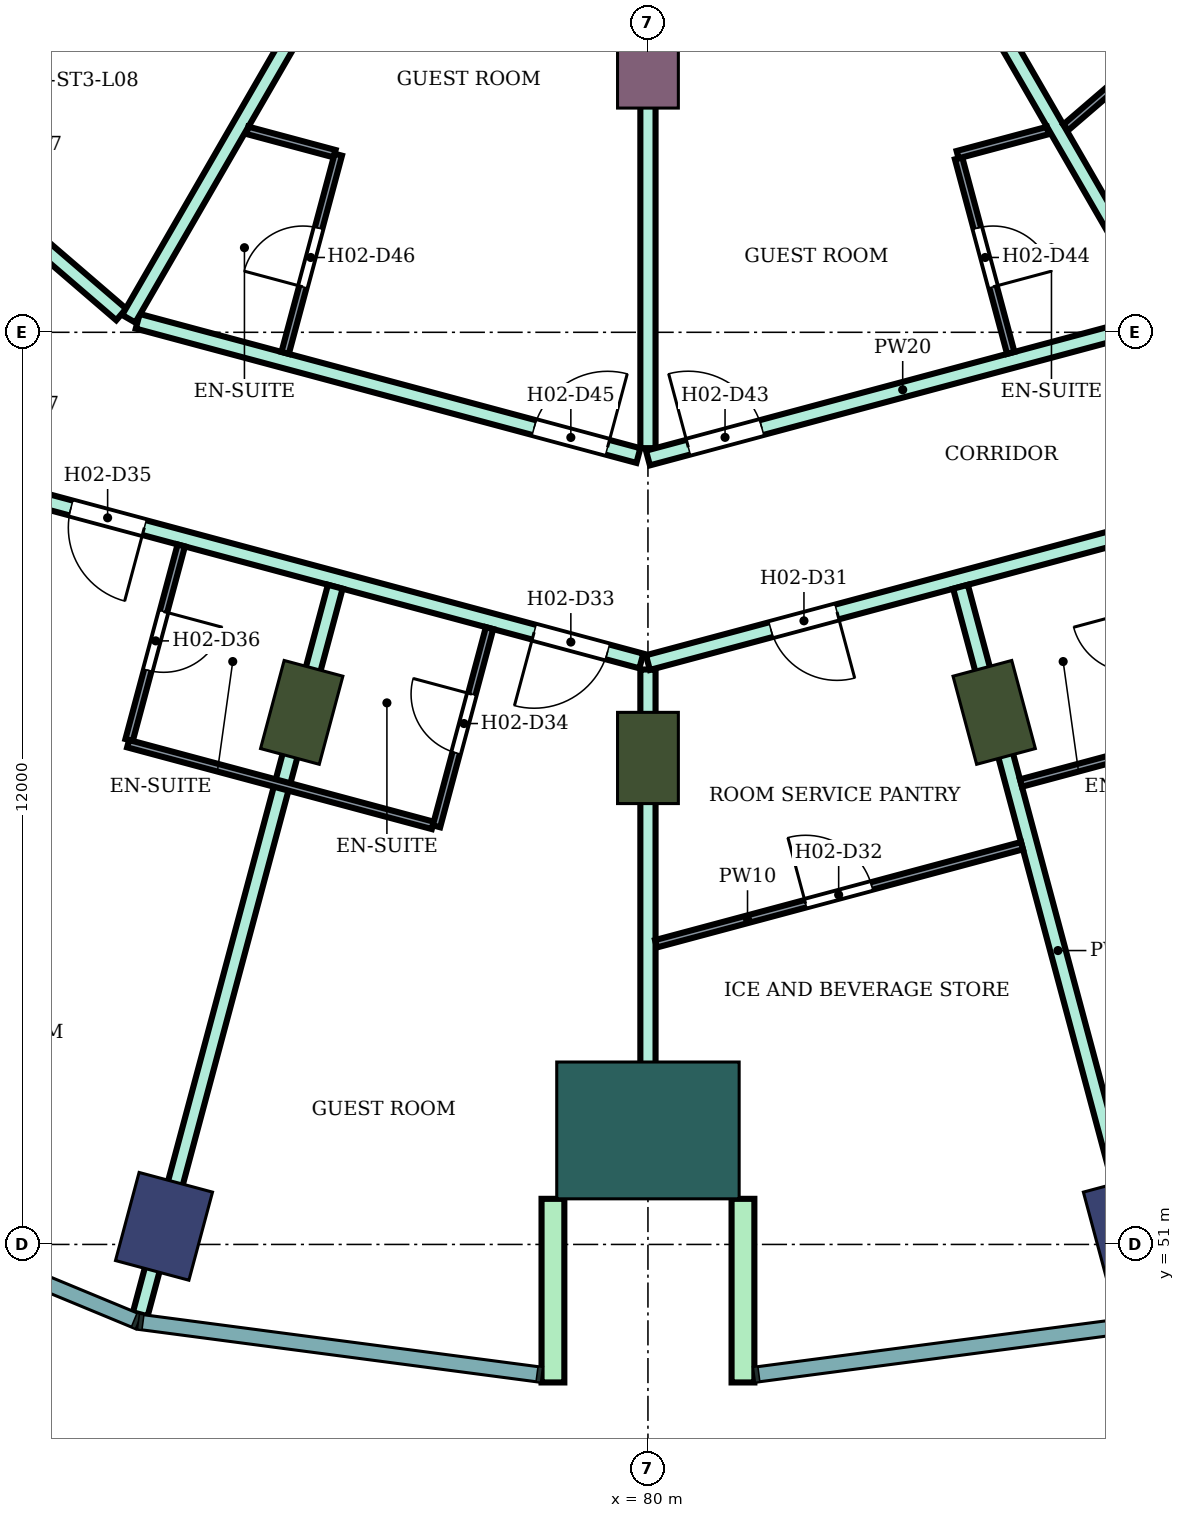
"""IFC4 building model, lengths in metres.
Left out: names, types, materials, properties, quantities, classifications, styles, units other than length and angle.
Written with IfcOpenShell. Run it as: python <this file> out.ifc"""

import sys

from ifc_helpers import new_model, si_unit, direction, frame, frame_2d, origin, origin_2d, place, context, subcontext, project, spatial, rectangle, extrude, element, fill, save


model = new_model("IFC4")
c1 = context("Model", 3, precision=1e-05, world=origin(), true_north=direction((0.0, 1.0)))
c2 = subcontext(c1, "Body", "Model", "MODEL_VIEW")
j1 = project(units=[si_unit("LENGTHUNIT", "METRE"), si_unit("PLANEANGLEUNIT", "RADIAN")], contexts=[c1])
p1 = place(None, origin())
s1 = spatial("IfcSite", under=j1, at=p1, CompositionType="ELEMENT")
p2 = place(p1, origin())
s2 = spatial("IfcBuilding", under=s1, at=p2, CompositionType="ELEMENT")
p3 = place(p2, frame((0.0, 0.0, 40.2)))
s3 = spatial("IfcBuildingStorey", under=s2, at=p3, CompositionType="ELEMENT", Elevation=40.2)
for number, where, z_axis, x_axis in (
    (1, (73.633, 51.238, 0.0), (0.0, 0.0, 1.0), (-0.259, -0.966, 0.0)),
    (2, (86.367, 51.238, 0.0), (0.0, 0.0, 1.0), (0.259, -0.966, 0.0)),
):
    element("IfcColumn", number, at=place(p3, frame(where, z_axis=z_axis, x_axis=x_axis)), inside=s3, PredefinedType="COLUMN", context=c2, shape_type="SweptSolid", body=[
        extrude(rectangle(XDim=1.2, YDim=1.0, at=origin_2d()), origin(), (0.0, 0.0, 1.0), 3.8),
    ])
for number, where, z_axis, x_axis in (
    (3, (75.445, 58.0, 0.0), (0.0, 0.0, 1.0), (-0.259, -0.966, 0.0)),
    (4, (80.0, 57.4, 0.0), (0.0, 0.0, 1.0), (0.0, -1.0, 0.0)),
    (5, (84.555, 58.0, 0.0), (0.0, 0.0, 1.0), (0.259, -0.966, 0.0)),
):
    element("IfcColumn", number, at=place(p3, frame(where, z_axis=z_axis, x_axis=x_axis)), inside=s3, PredefinedType="COLUMN", context=c2, shape_type="SweptSolid", body=[
        extrude(rectangle(XDim=1.2, YDim=0.8, at=origin_2d()), origin(), (0.0, 0.0, 1.0), 3.8),
    ])
p4 = place(p3, frame((80.0, 66.4, 0.0), z_axis=(0.0, 0.0, 1.0), x_axis=(0.0, -1.0, 0.0)))
e6 = element("IfcColumn", 6, at=p4, inside=s3, PredefinedType="COLUMN", context=c2, shape_type="SweptSolid", body=[
    extrude(rectangle(XDim=0.9, YDim=0.8, at=origin_2d()), origin(), (0.0, 0.0, 1.0), 3.8),
])
p5 = place(p3, frame((80.0, 52.5, 0.0), z_axis=(0.0, 0.0, 1.0), x_axis=(0.0, -1.0, 0.0)))
e7 = element("IfcColumn", 7, at=p5, inside=s3, PredefinedType="COLUMN", context=c2, shape_type="SweptSolid", body=[
    extrude(rectangle(XDim=1.8, YDim=2.4, at=origin_2d()), origin(), (0.0, 0.0, 1.0), 3.8),
])
for number, where, z_axis, x_axis in (
    (8, (78.75, 51.6, 0.0), (0.0, 0.0, 1.0), (0.0, -1.0, 0.0)),
    (9, (81.25, 51.6, 0.0), (0.0, 0.0, 1.0), (0.0, -1.0, 0.0)),
):
    element("IfcWall", number, at=place(p3, frame(where, z_axis=z_axis, x_axis=x_axis)), inside=s3, PredefinedType="NOTDEFINED", context=c2, shape_type="SweptSolid", body=[
        extrude(rectangle(XDim=2.416, YDim=0.3, at=frame_2d((1.208, 0.0))), origin(), (0.0, 0.0, 1.0), 3.8),
    ])
p6 = place(p3, frame((69.158, 66.6, 0.0), z_axis=(0.0, 0.0, 1.0), x_axis=(0.758063092745, -0.652181222835, 0.0)))
e10 = element("IfcWall", 10, at=p6, inside=s3, PredefinedType="PARTITIONING", context=c2, shape_type="SweptSolid", body=[
    extrude(rectangle(XDim=5.16, YDim=0.2, at=frame_2d((2.58, 0.0))), origin(), (0.0, 0.0, 1.0), 3.35),
])
p7 = place(p6, frame((2.165, 0.0, 0.0)))
e11 = element("IfcOpeningElement", 11, at=p7, cuts=e10, PredefinedType="OPENING", context=c2, shape_type="SweptSolid", body=[
    extrude(rectangle(XDim=0.9, YDim=2.1, at=frame_2d((0.45, 1.05))), frame((0.0, 0.11, 0.0), z_axis=(0.0, -1.0, 0.0), x_axis=(1.0, 0.0, 0.0)), (0.0, 0.0, 1.0), 0.22),
])
p8 = place(p3, frame((71.877, 60.832, 0.0), z_axis=(0.0, 0.0, 1.0), x_axis=(0.965852509869, -0.259092510851, 0.0)))
e12 = element("IfcWall", 12, at=p8, inside=s3, PredefinedType="PARTITIONING", context=c2, shape_type="SweptSolid", body=[
    extrude(rectangle(XDim=8.32, YDim=0.2, at=frame_2d((4.16, 0.0))), origin(), (0.0, 0.0, 1.0), 3.35),
])
p9 = place(p8, frame((6.86, 0.0, 0.0)))
e13 = element("IfcOpeningElement", 13, at=p9, cuts=e12, PredefinedType="OPENING", context=c2, shape_type="SweptSolid", body=[
    extrude(rectangle(XDim=1.0, YDim=2.1, at=frame_2d((0.5, 1.05))), frame((0.0, 0.11, 0.0), z_axis=(0.0, -1.0, 0.0), x_axis=(1.0, 0.0, 0.0)), (0.0, 0.0, 1.0), 0.22),
])
p10 = place(p8, frame((0.55, 0.0, 0.0)))
e14 = element("IfcOpeningElement", 14, at=p10, cuts=e12, PredefinedType="OPENING", context=c2, shape_type="SweptSolid", body=[
    extrude(rectangle(XDim=1.0, YDim=2.1, at=frame_2d((0.5, 1.05))), frame((0.0, 0.11, 0.0), z_axis=(0.0, -1.0, 0.0), x_axis=(1.0, 0.0, 0.0)), (0.0, 0.0, 1.0), 0.22),
])
p11 = place(p3, frame((73.287, 63.145, 0.0), z_axis=(0.0, 0.0, 1.0), x_axis=(0.965854200194, -0.259086209526, 0.0)))
e15 = element("IfcWall", 15, at=p11, inside=s3, PredefinedType="PARTITIONING", context=c2, shape_type="SweptSolid", body=[
    extrude(rectangle(XDim=6.82, YDim=0.2, at=frame_2d((3.41, 0.0))), origin(), (0.0, 0.0, 1.0), 3.35),
])
p12 = place(p11, frame((5.4, 0.0, 0.0)))
e16 = element("IfcOpeningElement", 16, at=p12, cuts=e15, PredefinedType="OPENING", context=c2, shape_type="SweptSolid", body=[
    extrude(rectangle(XDim=1.0, YDim=2.1, at=frame_2d((0.5, 1.05))), frame((0.0, 0.11, 0.0), z_axis=(0.0, -1.0, 0.0), x_axis=(1.0, 0.0, 0.0)), (0.0, 0.0, 1.0), 0.22),
])
p13 = place(p3, frame((73.169, 63.178, 0.0), z_axis=(0.0, 0.0, 1.0), x_axis=(0.50020860964, 0.865904929448, 0.0)))
e17 = element("IfcWall", 17, at=p13, inside=s3, PredefinedType="PARTITIONING", context=c2, shape_type="SweptSolid", body=[
    extrude(rectangle(XDim=5.955, YDim=0.2, at=frame_2d((2.978, 0.0))), origin(), (0.0, 0.0, 1.0), 3.35),
])
p14 = place(p3, frame((73.321, 50.081, 0.0), z_axis=(0.0, 0.0, 1.0), x_axis=(0.25891218439, 0.965900864879, 0.0)))
e18 = element("IfcWall", 18, at=p14, inside=s3, PredefinedType="PARTITIONING", context=c2, shape_type="SweptSolid", body=[
    extrude(rectangle(XDim=9.909, YDim=0.2, at=frame_2d((4.955, 0.0))), origin(), (0.0, 0.0, 1.0), 3.35),
])
p15 = place(p3, frame((80.0, 51.8, 0.0), z_axis=(0.0, 0.0, 1.0), x_axis=(0.0, 1.0, 0.0)))
e19 = element("IfcWall", 19, at=p15, inside=s3, PredefinedType="PARTITIONING", context=c2, shape_type="SweptSolid", body=[
    extrude(rectangle(XDim=6.764, YDim=0.2, at=frame_2d((3.382, 0.0))), origin(), (0.0, 0.0, 1.0), 3.35),
])
p16 = place(p3, frame((80.0, 58.655, 0.0), z_axis=(0.0, 0.0, 1.0), x_axis=(0.965967338894, 0.258664068224, 0.0)))
e20 = element("IfcWall", 20, at=p16, inside=s3, PredefinedType="PARTITIONING", context=c2, shape_type="SweptSolid", body=[
    extrude(rectangle(XDim=8.36, YDim=0.2, at=frame_2d((4.18, 0.0))), origin(), (0.0, 0.0, 1.0), 3.35),
])
p17 = place(p16, frame((6.86, 0.0, 0.0)))
e21 = element("IfcOpeningElement", 21, at=p17, cuts=e20, PredefinedType="OPENING", context=c2, shape_type="SweptSolid", body=[
    extrude(rectangle(XDim=1.0, YDim=2.1, at=frame_2d((0.5, 1.05))), frame((0.0, 0.11, 0.0), z_axis=(0.0, -1.0, 0.0), x_axis=(1.0, 0.0, 0.0)), (0.0, 0.0, 1.0), 0.22),
])
p18 = place(p16, frame((1.675, 0.0, 0.0)))
e22 = element("IfcOpeningElement", 22, at=p18, cuts=e20, PredefinedType="OPENING", context=c2, shape_type="SweptSolid", body=[
    extrude(rectangle(XDim=0.9, YDim=2.1, at=frame_2d((0.45, 1.05))), frame((0.0, 0.11, 0.0), z_axis=(0.0, -1.0, 0.0), x_axis=(1.0, 0.0, 0.0)), (0.0, 0.0, 1.0), 0.22),
])
p19 = place(p3, frame((80.0, 61.476, 0.0), z_axis=(0.0, 0.0, 1.0), x_axis=(0.0, 1.0, 0.0)))
e23 = element("IfcWall", 23, at=p19, inside=s3, PredefinedType="PARTITIONING", context=c2, shape_type="SweptSolid", body=[
    extrude(rectangle(XDim=5.825, YDim=0.2, at=frame_2d((2.913, 0.0))), origin(), (0.0, 0.0, 1.0), 3.35),
])
p20 = place(p3, frame((80.0, 61.346, 0.0), z_axis=(0.0, 0.0, 1.0), x_axis=(0.965924181808, 0.258825182312, 0.0)))
e24 = element("IfcWall", 24, at=p20, inside=s3, PredefinedType="PARTITIONING", context=c2, shape_type="SweptSolid", body=[
    extrude(rectangle(XDim=6.94, YDim=0.2, at=frame_2d((3.47, 0.0))), origin(), (0.0, 0.0, 1.0), 3.35),
])
p21 = place(p20, frame((0.55, 0.0, 0.0)))
e25 = element("IfcOpeningElement", 25, at=p21, cuts=e24, PredefinedType="OPENING", context=c2, shape_type="SweptSolid", body=[
    extrude(rectangle(XDim=1.0, YDim=2.1, at=frame_2d((0.5, 1.05))), frame((0.0, 0.11, 0.0), z_axis=(0.0, -1.0, 0.0), x_axis=(1.0, 0.0, 0.0)), (0.0, 0.0, 1.0), 0.22),
])
p22 = place(p3, frame((83.848, 68.332, 0.0), z_axis=(0.0, 0.0, 1.0), x_axis=(0.499919778085, -0.866071714975, 0.0)))
e26 = element("IfcWall", 26, at=p22, inside=s3, PredefinedType="PARTITIONING", context=c2, shape_type="SweptSolid", body=[
    extrude(rectangle(XDim=5.855, YDim=0.2, at=frame_2d((2.927, 0.0))), origin(), (0.0, 0.0, 1.0), 3.35),
])
p23 = place(p3, frame((84.112, 59.652, 0.0), z_axis=(0.0, 0.0, 1.0), x_axis=(0.258791091927, -0.965933315886, 0.0)))
e27 = element("IfcWall", 27, at=p23, inside=s3, PredefinedType="PARTITIONING", context=c2, shape_type="SweptSolid", body=[
    extrude(rectangle(XDim=9.909, YDim=0.2, at=frame_2d((4.955, 0.0))), origin(), (0.0, 0.0, 1.0), 3.35),
])
p24 = place(p3, frame((73.174, 57.636, 0.0), z_axis=(0.0, 0.0, 1.0), x_axis=(0.258952498977, 0.96589005755, 0.0)))
e28 = element("IfcWall", 28, at=p24, inside=s3, PredefinedType="PARTITIONING", context=c2, shape_type="SweptSolid", body=[
    extrude(rectangle(XDim=2.65, YDim=0.1, at=frame_2d((1.325, 0.0))), origin(), (0.0, 0.0, 1.0), 3.35),
])
p25 = place(p24, frame((0.95, 0.0, 0.0)))
e29 = element("IfcOpeningElement", 29, at=p25, cuts=e28, PredefinedType="OPENING", context=c2, shape_type="SweptSolid", body=[
    extrude(rectangle(XDim=0.8, YDim=2.1, at=frame_2d((0.4, 1.05))), frame((0.0, 0.06, 0.0), z_axis=(0.0, -1.0, 0.0), x_axis=(1.0, 0.0, 0.0)), (0.0, 0.0, 1.0), 0.12),
])
p26 = place(p3, frame((73.161, 57.588, 0.0), z_axis=(0.0, 0.0, 1.0), x_axis=(0.965858994467, -0.259068336173, 0.0)))
e30 = element("IfcWall", 30, at=p26, inside=s3, PredefinedType="PARTITIONING", context=c2, shape_type="SweptSolid", body=[
    extrude(rectangle(XDim=4.15, YDim=0.1, at=frame_2d((2.075, 0.0))), origin(), (0.0, 0.0, 1.0), 3.35),
])
p27 = place(p3, frame((74.729, 65.657, 0.0), z_axis=(0.0, 0.0, 1.0), x_axis=(0.965948051503, -0.258736085224, 0.0)))
e31 = element("IfcWall", 31, at=p27, inside=s3, PredefinedType="PARTITIONING", context=c2, shape_type="SweptSolid", body=[
    extrude(rectangle(XDim=1.189, YDim=0.1, at=frame_2d((0.594, 0.0))), origin(), (0.0, 0.0, 1.0), 3.35),
])
p28 = place(p3, frame((75.227, 62.729, 0.0), z_axis=(0.0, 0.0, 1.0), x_axis=(0.258945475746, 0.965891940432, 0.0)))
e32 = element("IfcWall", 32, at=p28, inside=s3, PredefinedType="PARTITIONING", context=c2, shape_type="SweptSolid", body=[
    extrude(rectangle(XDim=2.7, YDim=0.1, at=frame_2d((1.35, 0.0))), origin(), (0.0, 0.0, 1.0), 3.35),
])
p29 = place(p28, frame((0.9, 0.0, 0.0)))
e33 = element("IfcOpeningElement", 33, at=p29, cuts=e32, PredefinedType="OPENING", context=c2, shape_type="SweptSolid", body=[
    extrude(rectangle(XDim=0.8, YDim=2.1, at=frame_2d((0.4, 1.05))), frame((0.0, 0.06, 0.0), z_axis=(0.0, -1.0, 0.0), x_axis=(1.0, 0.0, 0.0)), (0.0, 0.0, 1.0), 0.12),
])
p30 = place(p3, frame((77.218, 56.501, 0.0), z_axis=(0.0, 0.0, 1.0), x_axis=(0.258591408257, 0.965986792651, 0.0)))
e34 = element("IfcWall", 34, at=p30, inside=s3, PredefinedType="PARTITIONING", context=c2, shape_type="SweptSolid", body=[
    extrude(rectangle(XDim=2.699, YDim=0.1, at=frame_2d((1.35, 0.0))), origin(), (0.0, 0.0, 1.0), 3.35),
])
p31 = place(p30, frame((1.0, 0.0, 0.0)))
e35 = element("IfcOpeningElement", 35, at=p31, cuts=e34, PredefinedType="OPENING", context=c2, shape_type="SweptSolid", body=[
    extrude(rectangle(XDim=0.8, YDim=2.1, at=frame_2d((0.4, 1.05))), frame((0.0, 0.06, 0.0), z_axis=(0.0, -1.0, 0.0), x_axis=(1.0, 0.0, 0.0)), (0.0, 0.0, 1.0), 0.12),
])
p32 = place(p3, frame((80.106, 54.956, 0.0), z_axis=(0.0, 0.0, 1.0), x_axis=(0.965910666284, 0.258875616386, 0.0)))
e36 = element("IfcWall", 36, at=p32, inside=s3, PredefinedType="PARTITIONING", context=c2, shape_type="SweptSolid", body=[
    extrude(rectangle(XDim=4.985, YDim=0.1, at=frame_2d((2.493, 0.0))), origin(), (0.0, 0.0, 1.0), 3.35),
])
p33 = place(p32, frame((2.038, 0.0, 0.0)))
e37 = element("IfcOpeningElement", 37, at=p33, cuts=e36, PredefinedType="OPENING", context=c2, shape_type="SweptSolid", body=[
    extrude(rectangle(XDim=0.9, YDim=2.1, at=frame_2d((0.45, 1.05))), frame((0.0, 0.06, 0.0), z_axis=(0.0, -1.0, 0.0), x_axis=(1.0, 0.0, 0.0)), (0.0, 0.0, 1.0), 0.12),
])
p34 = place(p3, frame((84.087, 65.289, 0.0), z_axis=(0.0, 0.0, 1.0), x_axis=(0.258929459649, -0.965896234037, 0.0)))
e38 = element("IfcWall", 38, at=p34, inside=s3, PredefinedType="PARTITIONING", context=c2, shape_type="SweptSolid", body=[
    extrude(rectangle(XDim=2.65, YDim=0.1, at=frame_2d((1.325, 0.0))), origin(), (0.0, 0.0, 1.0), 3.35),
])
p35 = place(p34, frame((0.95, 0.0, 0.0)))
e39 = element("IfcOpeningElement", 39, at=p35, cuts=e38, PredefinedType="OPENING", context=c2, shape_type="SweptSolid", body=[
    extrude(rectangle(XDim=0.8, YDim=2.1, at=frame_2d((0.4, 1.05))), frame((0.0, 0.06, 0.0), z_axis=(0.0, -1.0, 0.0), x_axis=(1.0, 0.0, 0.0)), (0.0, 0.0, 1.0), 0.12),
])
p36 = place(p3, frame((84.074, 65.337, 0.0), z_axis=(0.0, 0.0, 1.0), x_axis=(0.965914351064, 0.258861867428, 0.0)))
e40 = element("IfcWall", 40, at=p36, inside=s3, PredefinedType="PARTITIONING", context=c2, shape_type="SweptSolid", body=[
    extrude(rectangle(XDim=1.229, YDim=0.1, at=frame_2d((0.615, 0.0))), origin(), (0.0, 0.0, 1.0), 3.35),
])
p37 = place(p3, frame((84.908, 57.07, 0.0), z_axis=(0.0, 0.0, 1.0), x_axis=(0.965853538138, 0.25908867761, 0.0)))
e41 = element("IfcWall", 41, at=p37, inside=s3, PredefinedType="PARTITIONING", context=c2, shape_type="SweptSolid", body=[
    extrude(rectangle(XDim=1.95, YDim=0.1, at=frame_2d((0.975, 0.0))), origin(), (0.0, 0.0, 1.0), 3.35),
])
p38 = place(p3, frame((85.497, 65.696, 0.0), z_axis=(0.0, 0.0, 1.0), x_axis=(0.75817032582, 0.652056559698, 0.0)))
e42 = element("IfcWall", 42, at=p38, inside=s3, PredefinedType="PARTITIONING", context=c2, shape_type="SweptSolid", body=[
    extrude(rectangle(XDim=1.461, YDim=0.1, at=frame_2d((0.73, 0.0))), origin(), (0.0, 0.0, 1.0), 3.35),
])
p39 = place(p18, frame((0.9, 0.0, 0.0), z_axis=(0.0, 0.0, 1.0), x_axis=(-1.0, 0.0, 0.0)))
e43 = element("IfcDoor", 43, at=p39, inside=s3, OperationType="SINGLE_SWING_LEFT", PredefinedType="DOOR", context=c2, shape_type="SweptSolid", body=[
    extrude(rectangle(XDim=0.9, YDim=2.1, at=frame_2d((0.45, 1.05))), frame((0.0, 0.025, 0.0), z_axis=(0.0, -1.0, 0.0), x_axis=(1.0, 0.0, 0.0)), (0.0, 0.0, 1.0), 0.05),
])
fill(e22, e43)
p40 = place(p33, origin())
e44 = element("IfcDoor", 44, at=p40, inside=s3, OperationType="SINGLE_SWING_LEFT", PredefinedType="DOOR", context=c2, shape_type="SweptSolid", body=[
    extrude(rectangle(XDim=0.9, YDim=2.1, at=frame_2d((0.45, 1.05))), frame((0.0, 0.025, 0.0), z_axis=(0.0, -1.0, 0.0), x_axis=(1.0, 0.0, 0.0)), (0.0, 0.0, 1.0), 0.05),
])
fill(e37, e44)
p41 = place(p9, frame((1.0, 0.0, 0.0), z_axis=(0.0, 0.0, 1.0), x_axis=(-1.0, 0.0, 0.0)))
e45 = element("IfcDoor", 45, at=p41, inside=s3, OperationType="SINGLE_SWING_RIGHT", PredefinedType="DOOR", context=c2, shape_type="SweptSolid", body=[
    extrude(rectangle(XDim=1.0, YDim=2.1, at=frame_2d((0.5, 1.05))), frame((0.0, 0.025, 0.0), z_axis=(0.0, -1.0, 0.0), x_axis=(1.0, 0.0, 0.0)), (0.0, 0.0, 1.0), 0.05),
])
fill(e13, e45)
p42 = place(p31, origin())
e46 = element("IfcDoor", 46, at=p42, inside=s3, OperationType="SINGLE_SWING_RIGHT", PredefinedType="DOOR", context=c2, shape_type="SweptSolid", body=[
    extrude(rectangle(XDim=0.8, YDim=2.1, at=frame_2d((0.4, 1.05))), frame((0.0, 0.025, 0.0), z_axis=(0.0, -1.0, 0.0), x_axis=(1.0, 0.0, 0.0)), (0.0, 0.0, 1.0), 0.05),
])
fill(e35, e46)
p43 = place(p10, frame((1.0, 0.0, 0.0), z_axis=(0.0, 0.0, 1.0), x_axis=(-1.0, 0.0, 0.0)))
e47 = element("IfcDoor", 47, at=p43, inside=s3, OperationType="SINGLE_SWING_LEFT", PredefinedType="DOOR", context=c2, shape_type="SweptSolid", body=[
    extrude(rectangle(XDim=1.0, YDim=2.1, at=frame_2d((0.5, 1.05))), frame((0.0, 0.025, 0.0), z_axis=(0.0, -1.0, 0.0), x_axis=(1.0, 0.0, 0.0)), (0.0, 0.0, 1.0), 0.05),
])
fill(e14, e47)
p44 = place(p25, frame((0.8, 0.0, 0.0), z_axis=(0.0, 0.0, 1.0), x_axis=(-1.0, 0.0, 0.0)))
e48 = element("IfcDoor", 48, at=p44, inside=s3, OperationType="SINGLE_SWING_LEFT", PredefinedType="DOOR", context=c2, shape_type="SweptSolid", body=[
    extrude(rectangle(XDim=0.8, YDim=2.1, at=frame_2d((0.4, 1.05))), frame((0.0, 0.025, 0.0), z_axis=(0.0, -1.0, 0.0), x_axis=(1.0, 0.0, 0.0)), (0.0, 0.0, 1.0), 0.05),
])
fill(e29, e48)
p45 = place(p21, origin())
e49 = element("IfcDoor", 49, at=p45, inside=s3, OperationType="SINGLE_SWING_LEFT", PredefinedType="DOOR", context=c2, shape_type="SweptSolid", body=[
    extrude(rectangle(XDim=1.0, YDim=2.1, at=frame_2d((0.5, 1.05))), frame((0.0, 0.025, 0.0), z_axis=(0.0, -1.0, 0.0), x_axis=(1.0, 0.0, 0.0)), (0.0, 0.0, 1.0), 0.05),
])
fill(e25, e49)
p46 = place(p35, origin())
e50 = element("IfcDoor", 50, at=p46, inside=s3, OperationType="SINGLE_SWING_RIGHT", PredefinedType="DOOR", context=c2, shape_type="SweptSolid", body=[
    extrude(rectangle(XDim=0.8, YDim=2.1, at=frame_2d((0.4, 1.05))), frame((0.0, 0.025, 0.0), z_axis=(0.0, -1.0, 0.0), x_axis=(1.0, 0.0, 0.0)), (0.0, 0.0, 1.0), 0.05),
])
fill(e39, e50)
p47 = place(p12, origin())
e51 = element("IfcDoor", 51, at=p47, inside=s3, OperationType="SINGLE_SWING_RIGHT", PredefinedType="DOOR", context=c2, shape_type="SweptSolid", body=[
    extrude(rectangle(XDim=1.0, YDim=2.1, at=frame_2d((0.5, 1.05))), frame((0.0, 0.025, 0.0), z_axis=(0.0, -1.0, 0.0), x_axis=(1.0, 0.0, 0.0)), (0.0, 0.0, 1.0), 0.05),
])
fill(e16, e51)
p48 = place(p29, origin())
e52 = element("IfcDoor", 52, at=p48, inside=s3, OperationType="SINGLE_SWING_LEFT", PredefinedType="DOOR", context=c2, shape_type="SweptSolid", body=[
    extrude(rectangle(XDim=0.8, YDim=2.1, at=frame_2d((0.4, 1.05))), frame((0.0, 0.025, 0.0), z_axis=(0.0, -1.0, 0.0), x_axis=(1.0, 0.0, 0.0)), (0.0, 0.0, 1.0), 0.05),
])
fill(e33, e52)
save(model, sys.argv[1])
